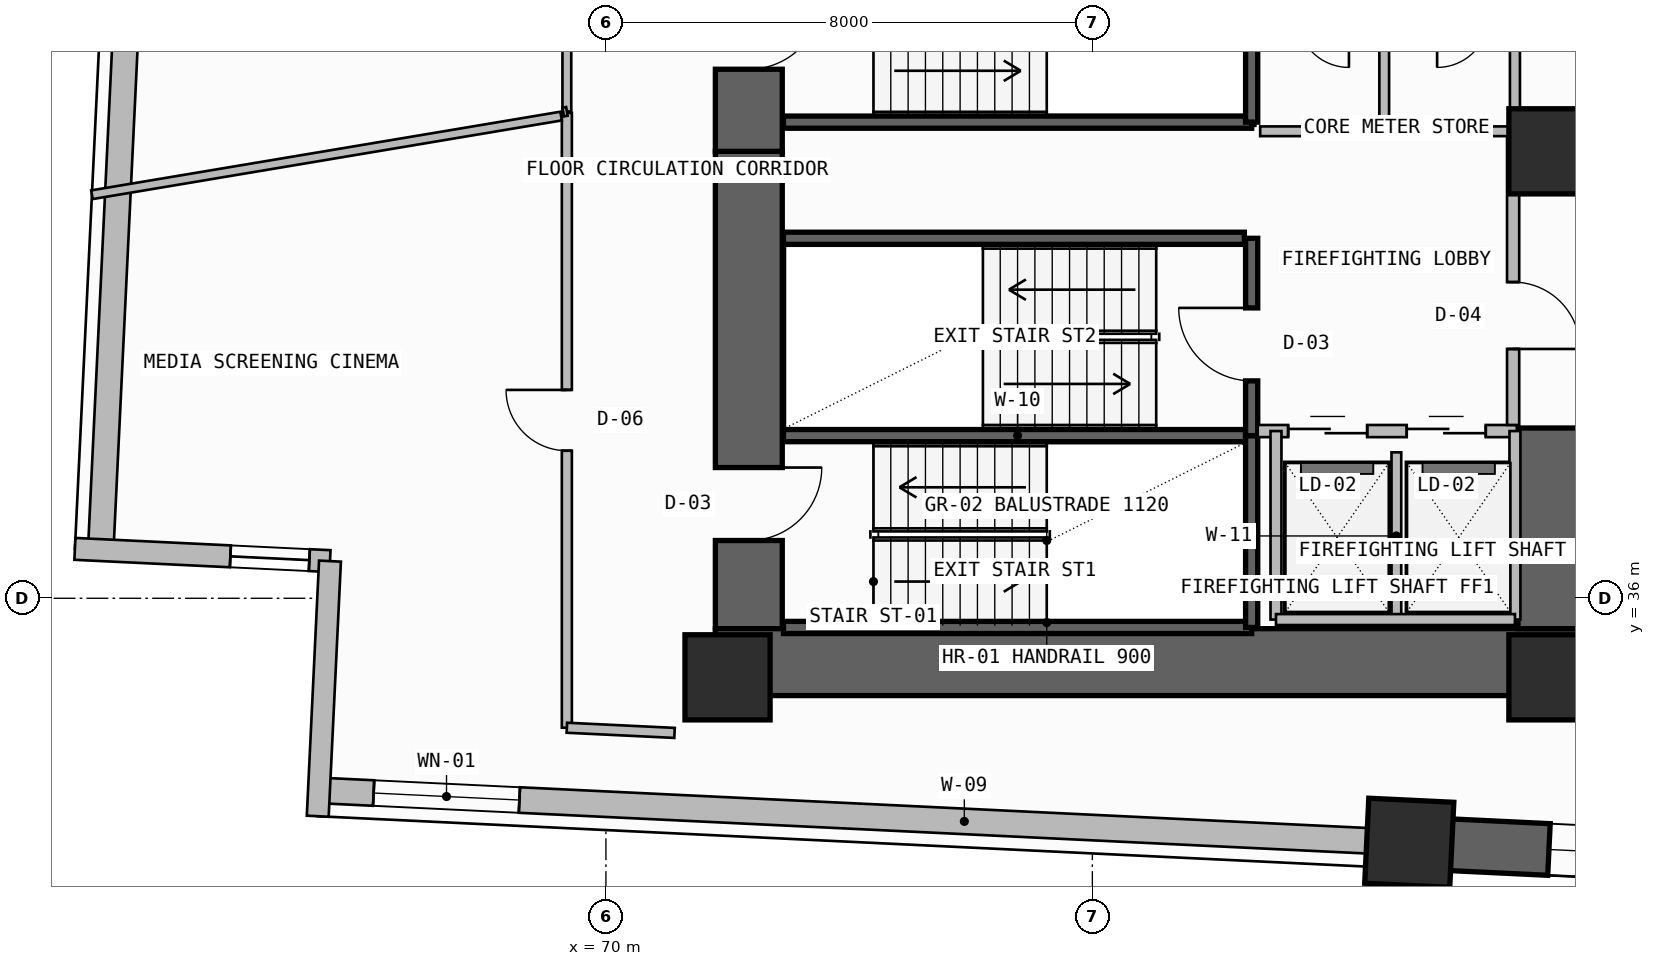
"""IFC4 building model, lengths in metres.
Left out: names, types, materials, properties, quantities, classifications, styles, units other than length and angle.
Written with IfcOpenShell. Run it as: python <this file> out.ifc"""

import sys

from ifc_helpers import new_model, si_unit, direction, frame, frame_2d, origin, origin_2d, place, context, subcontext, project, spatial, rectangle, extrude, element, fill, save


model = new_model("IFC4")
c1 = context("Model", 3, precision=1e-05, world=origin(), true_north=direction((0.0, 1.0)))
c2 = subcontext(c1, "Body", "Model", "MODEL_VIEW")
j1 = project(units=[si_unit("LENGTHUNIT", "METRE"), si_unit("PLANEANGLEUNIT", "RADIAN")], contexts=[c1])
p1 = place(None, origin())
s1 = spatial("IfcSite", under=j1, at=p1, CompositionType="ELEMENT")
p2 = place(p1, origin())
s2 = spatial("IfcBuilding", under=s1, at=p2, CompositionType="ELEMENT")
p3 = place(p2, frame((0.0, 0.0, 55.5)))
s3 = spatial("IfcBuildingStorey", under=s2, at=p3, CompositionType="ELEMENT", Elevation=55.5)
p4 = place(p3, frame((72.35, 35.5, -0.2), z_axis=(0.0, 0.0, 1.0), x_axis=(0.0, 1.0, 0.0)))
e1 = element("IfcWall", 1, at=p4, inside=s3, PredefinedType="SHEAR", context=c2, shape_type="SweptSolid", body=[
    extrude(rectangle(XDim=7.85, YDim=1.1, at=frame_2d((3.925, 0.0))), origin(), (0.0, 0.0, 1.0), 3.3),
])
p5 = place(p4, frame((1.45, 0.0, 0.2)))
e2 = element("IfcOpeningElement", 2, at=p5, cuts=e1, PredefinedType="OPENING", context=c2, shape_type="SweptSolid", body=[
    extrude(rectangle(XDim=1.2, YDim=2.2, at=frame_2d((0.6, 1.1))), frame((0.0, 0.56, 0.0), z_axis=(0.0, -1.0, 0.0), x_axis=(1.0, 0.0, 0.0)), (0.0, 0.0, 1.0), 1.12),
])
p6 = place(p3, frame((71.8, 34.95, -0.2), z_axis=(0.0, 0.0, 1.0), x_axis=(1.0, 0.0, 0.0)))
e3 = element("IfcWall", 3, at=p6, inside=s3, PredefinedType="SHEAR", context=c2, shape_type="SweptSolid", body=[
    extrude(rectangle(XDim=14.3, YDim=1.1, at=frame_2d((7.15, 0.0))), origin(), (0.0, 0.0, 1.0), 3.3),
])
p7 = place(p3, frame((85.55, 35.5, -0.2), z_axis=(0.0, 0.0, 1.0), x_axis=(0.0, 1.0, 0.0)))
e4 = element("IfcWall", 4, at=p7, inside=s3, PredefinedType="SHEAR", context=c2, shape_type="SweptSolid", body=[
    extrude(rectangle(XDim=3.3, YDim=1.1, at=frame_2d((1.65, 0.0))), origin(), (0.0, 0.0, 1.0), 3.3),
])
p8 = place(p3, frame((72.35, 43.35, -0.2), z_axis=(0.0, 0.0, 1.0), x_axis=(0.0, 1.0, 0.0)))
e5 = element("IfcWall", 5, at=p8, inside=s3, PredefinedType="SHEAR", context=c2, shape_type="SweptSolid", body=[
    extrude(rectangle(XDim=12.7, YDim=1.1, at=frame_2d((6.35, 0.0))), origin(), (0.0, 0.0, 1.0), 3.3),
])
p9 = place(p8, frame((1.35, 0.0, 0.2)))
e6 = element("IfcOpeningElement", 6, at=p9, cuts=e5, PredefinedType="OPENING", context=c2, shape_type="SweptSolid", body=[
    extrude(rectangle(XDim=1.2, YDim=2.2, at=frame_2d((0.6, 1.1))), frame((0.0, 0.56, 0.0), z_axis=(0.0, -1.0, 0.0), x_axis=(1.0, 0.0, 0.0)), (0.0, 0.0, 1.0), 1.12),
])
for number, where, z_axis, x_axis in (
    (7, (72.0, 34.7, 0.0), (0.0, 0.0, 1.0), (1.0, 0.0, 0.0)),
    (8, (85.55, 34.7, 0.0), (0.0, 0.0, 1.0), (1.0, 0.0, 0.0)),
    (9, (85.55, 43.35, 0.0), (0.0, 0.0, 1.0), (1.0, 0.0, 0.0)),
    (10, (83.212, 31.979, 0.0), (0.0, 0.0, 1.0), (-0.999, 0.048, 0.0)),
):
    element("IfcColumn", number, at=place(p3, frame(where, z_axis=z_axis, x_axis=x_axis)), inside=s3, PredefinedType="COLUMN", context=c2, shape_type="SweptSolid", body=[
        extrude(rectangle(XDim=1.4, YDim=1.4, at=origin_2d()), origin(), (0.0, 0.0, 1.0), 3.6),
    ])
p10 = place(p3, frame((65.281, 32.841, 0.0), z_axis=(0.0, 0.0, 1.0), x_axis=(0.998848298084, -0.047979968897, 0.0)))
e11 = element("IfcWall", 11, at=p10, inside=s3, PredefinedType="SOLIDWALL", context=c2, shape_type="SweptSolid", body=[
    extrude(rectangle(XDim=17.952, YDim=0.42, at=frame_2d((8.976, 0.0))), origin(), (0.0, 0.0, 1.0), 2.485),
])
p11 = place(p10, frame((0.9, 0.0, 1.2)))
e12 = element("IfcOpeningElement", 12, at=p11, cuts=e11, PredefinedType="OPENING", context=c2, shape_type="SweptSolid", body=[
    extrude(rectangle(XDim=2.4, YDim=0.9, at=frame_2d((1.2, 0.45))), frame((0.0, 0.22, 0.0), z_axis=(0.0, -1.0, 0.0), x_axis=(1.0, 0.0, 0.0)), (0.0, 0.0, 1.0), 0.44),
])
p12 = place(p3, frame((83.212, 31.979, -0.2), z_axis=(0.0, 0.0, 1.0), x_axis=(0.998848235141, -0.047981279227, 0.0)))
e13 = element("IfcWall", 13, at=p12, inside=s3, PredefinedType="SHEAR", context=c2, shape_type="SweptSolid", body=[
    extrude(rectangle(XDim=27.456, YDim=0.85, at=frame_2d((13.728, 0.0))), origin(), (0.0, 0.0, 1.0), 3.3),
])
p13 = place(p12, frame((2.3, 0.0, 1.2)))
e14 = element("IfcOpeningElement", 14, at=p13, cuts=e13, PredefinedType="OPENING", context=c2, shape_type="SweptSolid", body=[
    extrude(rectangle(XDim=2.4, YDim=0.9, at=frame_2d((1.2, 0.45))), frame((0.0, 0.435, 0.0), z_axis=(0.0, -1.0, 0.0), x_axis=(1.0, 0.0, 0.0)), (0.0, 0.0, 1.0), 0.87),
])
p14 = place(p3, frame((62.378, 51.09, 0.0), z_axis=(0.0, 0.0, 1.0), x_axis=(-0.047978424452, -0.99884837227, 0.0)))
e15 = element("IfcWall", 15, at=p14, inside=s3, PredefinedType="SOLIDWALL", context=c2, shape_type="SweptSolid", body=[
    extrude(rectangle(XDim=14.314, YDim=0.42, at=frame_2d((7.157, 0.0))), origin(), (0.0, 0.0, 1.0), 2.485),
])
p15 = place(p14, frame((2.3, 0.0, 1.2)))
e16 = element("IfcOpeningElement", 16, at=p15, cuts=e15, PredefinedType="OPENING", context=c2, shape_type="SweptSolid", body=[
    extrude(rectangle(XDim=2.4, YDim=0.9, at=frame_2d((1.2, 0.45))), frame((0.0, 0.22, 0.0), z_axis=(0.0, -1.0, 0.0), x_axis=(1.0, 0.0, 0.0)), (0.0, 0.0, 1.0), 0.44),
])
p16 = place(p3, frame((61.267, 36.812, 0.0), z_axis=(0.0, 0.0, 1.0), x_axis=(0.998849519138, -0.047954542207, 0.0)))
e17 = element("IfcWall", 17, at=p16, inside=s3, PredefinedType="SOLIDWALL", context=c2, shape_type="SweptSolid", body=[
    extrude(rectangle(XDim=4.2, YDim=0.36, at=frame_2d((2.1, 0.0))), origin(), (0.0, 0.0, 1.0), 3.1),
])
p17 = place(p16, frame((2.56, 0.0, 0.45)))
e18 = element("IfcOpeningElement", 18, at=p17, cuts=e17, PredefinedType="OPENING", context=c2, shape_type="SweptSolid", body=[
    extrude(rectangle(XDim=1.3, YDim=2.4, at=frame_2d((0.65, 1.2))), frame((0.0, 0.19, 0.0), z_axis=(0.0, -1.0, 0.0), x_axis=(1.0, 0.0, 0.0)), (0.0, 0.0, 1.0), 0.38),
])
p18 = place(p3, frame((65.462, 36.611, 0.0), z_axis=(0.0, 0.0, 1.0), x_axis=(-0.048015322758, -0.998846599224, 0.0)))
e19 = element("IfcWall", 19, at=p18, inside=s3, PredefinedType="SOLIDWALL", context=c2, shape_type="SweptSolid", body=[
    extrude(rectangle(XDim=4.2, YDim=0.36, at=frame_2d((2.1, 0.0))), origin(), (0.0, 0.0, 1.0), 3.1),
])
for number, where, z_axis, x_axis in (
    (20, (72.92, 35.52, -0.2), (0.0, 0.0, 1.0), (1.0, 0.0, 0.0)),
    (21, (72.92, 38.675, -0.2), (0.0, 0.0, 1.0), (1.0, 0.0, 0.0)),
):
    element("IfcWall", number, at=place(p3, frame(where, z_axis=z_axis, x_axis=x_axis)), inside=s3, PredefinedType="SOLIDWALL", context=c2, shape_type="SweptSolid", body=[
        extrude(rectangle(XDim=7.7, YDim=0.2, at=frame_2d((3.85, 0.0))), origin(), (0.0, 0.0, 1.0), 3.3),
    ])
p19 = place(p3, frame((80.62, 35.52, -0.2), z_axis=(0.0, 0.0, 1.0), x_axis=(0.0, 1.0, 0.0)))
e22 = element("IfcWall", 22, at=p19, inside=s3, PredefinedType="SOLIDWALL", context=c2, shape_type="SweptSolid", body=[
    extrude(rectangle(XDim=3.155, YDim=0.2, at=frame_2d((1.578, 0.0))), origin(), (0.0, 0.0, 1.0), 3.3),
])
p20 = place(p3, frame((80.62, 38.675, -0.2), z_axis=(0.0, 0.0, 1.0), x_axis=(0.0, 1.0, 0.0)))
e23 = element("IfcWall", 23, at=p20, inside=s3, PredefinedType="SOLIDWALL", context=c2, shape_type="SweptSolid", body=[
    extrude(rectangle(XDim=3.245, YDim=0.2, at=frame_2d((1.623, 0.0))), origin(), (0.0, 0.0, 1.0), 3.3),
])
p21 = place(p20, frame((0.9, 0.0, 0.2)))
e24 = element("IfcOpeningElement", 24, at=p21, cuts=e23, PredefinedType="OPENING", context=c2, shape_type="SweptSolid", body=[
    extrude(rectangle(XDim=1.2, YDim=2.2, at=frame_2d((0.6, 1.1))), frame((0.0, 0.11, 0.0), z_axis=(0.0, -1.0, 0.0), x_axis=(1.0, 0.0, 0.0)), (0.0, 0.0, 1.0), 0.22),
])
p22 = place(p3, frame((80.72, 38.75, 0.0), z_axis=(0.0, 0.0, 1.0), x_axis=(1.0, 0.0, 0.0)))
e25 = element("IfcWall", 25, at=p22, inside=s3, PredefinedType="SOLIDWALL", context=c2, shape_type="SweptSolid", body=[
    extrude(rectangle(XDim=4.26, YDim=0.2, at=frame_2d((2.13, 0.0))), origin(), (0.0, 0.0, 1.0), 3.1),
])
p23 = place(p22, frame((0.5, 0.0, 0.0)))
e26 = element("IfcOpeningElement", 26, at=p23, cuts=e25, PredefinedType="OPENING", context=c2, shape_type="SweptSolid", body=[
    extrude(rectangle(XDim=1.3, YDim=2.3, at=frame_2d((0.65, 1.15))), frame((0.0, 0.11, 0.0), z_axis=(0.0, -1.0, 0.0), x_axis=(1.0, 0.0, 0.0)), (0.0, 0.0, 1.0), 0.22),
])
p24 = place(p22, frame((2.45, 0.0, 0.0)))
e27 = element("IfcOpeningElement", 27, at=p24, cuts=e25, PredefinedType="OPENING", context=c2, shape_type="SweptSolid", body=[
    extrude(rectangle(XDim=1.3, YDim=2.3, at=frame_2d((0.65, 1.15))), frame((0.0, 0.11, 0.0), z_axis=(0.0, -1.0, 0.0), x_axis=(1.0, 0.0, 0.0)), (0.0, 0.0, 1.0), 0.22),
])
p25 = place(p3, frame((83.0, 35.65, 0.0), z_axis=(0.0, 0.0, 1.0), x_axis=(0.0, 1.0, 0.0)))
e28 = element("IfcWall", 28, at=p25, inside=s3, PredefinedType="PLUMBINGWALL", context=c2, shape_type="SweptSolid", body=[
    extrude(rectangle(XDim=2.75, YDim=0.16, at=frame_2d((1.375, 0.0))), origin(), (0.0, 0.0, 1.0), 3.1),
])
for number, where, z_axis, x_axis in (
    (29, (84.95, 35.65, 0.0), (0.0, 0.0, 1.0), (0.0, 1.0, 0.0)),
    (30, (81.02, 35.65, 0.0), (0.0, 0.0, 1.0), (0.0, 1.0, 0.0)),
):
    element("IfcWall", number, at=place(p3, frame(where, z_axis=z_axis, x_axis=x_axis)), inside=s3, PredefinedType="SOLIDWALL", context=c2, shape_type="SweptSolid", body=[
        extrude(rectangle(XDim=3.1, YDim=0.18, at=frame_2d((1.55, 0.0))), origin(), (0.0, 0.0, 1.0), 3.1),
    ])
p26 = place(p3, frame((81.02, 35.65, 0.0), z_axis=(0.0, 0.0, 1.0), x_axis=(1.0, 0.0, 0.0)))
e31 = element("IfcWall", 31, at=p26, inside=s3, PredefinedType="SOLIDWALL", context=c2, shape_type="SweptSolid", body=[
    extrude(rectangle(XDim=3.93, YDim=0.18, at=frame_2d((1.965, 0.0))), origin(), (0.0, 0.0, 1.0), 3.1),
])
p27 = place(p3, frame((84.92, 38.85, 0.0), z_axis=(0.0, 0.0, 1.0), x_axis=(0.0, 1.0, 0.0)))
e32 = element("IfcWall", 32, at=p27, inside=s3, PredefinedType="SOLIDWALL", context=c2, shape_type="SweptSolid", body=[
    extrude(rectangle(XDim=4.83, YDim=0.2, at=frame_2d((2.415, 0.0))), origin(), (0.0, 0.0, 1.0), 3.1),
])
p28 = place(p27, frame((1.25, 0.0, 0.0)))
e33 = element("IfcOpeningElement", 33, at=p28, cuts=e32, PredefinedType="OPENING", context=c2, shape_type="SweptSolid", body=[
    extrude(rectangle(XDim=1.1, YDim=2.2, at=frame_2d((0.55, 1.1))), frame((0.0, 0.11, 0.0), z_axis=(0.0, -1.0, 0.0), x_axis=(1.0, 0.0, 0.0)), (0.0, 0.0, 1.0), 0.22),
])
p29 = place(p3, frame((72.92, 41.92, -0.2), z_axis=(0.0, 0.0, 1.0), x_axis=(1.0, 0.0, 0.0)))
e34 = element("IfcWall", 34, at=p29, inside=s3, PredefinedType="SOLIDWALL", context=c2, shape_type="SweptSolid", body=[
    extrude(rectangle(XDim=7.58, YDim=0.2, at=frame_2d((3.79, 0.0))), origin(), (0.0, 0.0, 1.0), 3.3),
])
p30 = place(p3, frame((72.92, 43.83, -0.2), z_axis=(0.0, 0.0, 1.0), x_axis=(1.0, 0.0, 0.0)))
e35 = element("IfcWall", 35, at=p30, inside=s3, PredefinedType="SOLIDWALL", context=c2, shape_type="SweptSolid", body=[
    extrude(rectangle(XDim=7.7, YDim=0.2, at=frame_2d((3.85, 0.0))), origin(), (0.0, 0.0, 1.0), 3.3),
])
p31 = place(p3, frame((80.62, 43.83, -0.2), z_axis=(0.0, 0.0, 1.0), x_axis=(0.0, 1.0, 0.0)))
e36 = element("IfcWall", 36, at=p31, inside=s3, PredefinedType="SOLIDWALL", context=c2, shape_type="SweptSolid", body=[
    extrude(rectangle(XDim=3.24, YDim=0.2, at=frame_2d((1.62, 0.0))), origin(), (0.0, 0.0, 1.0), 3.3),
])
p32 = place(p3, frame((84.95, 43.68, 0.0), z_axis=(0.0, 0.0, 1.0), x_axis=(0.0, 1.0, 0.0)))
e37 = element("IfcWall", 37, at=p32, inside=s3, PredefinedType="PLUMBINGWALL", context=c2, shape_type="SweptSolid", body=[
    extrude(rectangle(XDim=1.9, YDim=0.165, at=frame_2d((0.95, 0.0))), origin(), (0.0, 0.0, 1.0), 3.1),
])
p33 = place(p3, frame((80.76, 43.68, 0.0), z_axis=(0.0, 0.0, 1.0), x_axis=(1.0, 0.0, 0.0)))
e38 = element("IfcWall", 38, at=p33, inside=s3, PredefinedType="PLUMBINGWALL", context=c2, shape_type="SweptSolid", body=[
    extrude(rectangle(XDim=4.19, YDim=0.16, at=frame_2d((2.095, 0.0))), origin(), (0.0, 0.0, 1.0), 3.1),
])
p34 = place(p3, frame((82.8, 43.68, 0.0), z_axis=(0.0, 0.0, 1.0), x_axis=(0.0, 1.0, 0.0)))
e39 = element("IfcWall", 39, at=p34, inside=s3, PredefinedType="PLUMBINGWALL", context=c2, shape_type="SweptSolid", body=[
    extrude(rectangle(XDim=1.9, YDim=0.16, at=frame_2d((0.95, 0.0))), origin(), (0.0, 0.0, 1.0), 3.1),
])
p35 = place(p3, frame((69.357, 43.982, 0.0), z_axis=(0.0, 0.0, 1.0), x_axis=(0.0, -1.0, 0.0)))
e40 = element("IfcWall", 40, at=p35, inside=s3, PredefinedType="PARTITIONING", context=c2, shape_type="SweptSolid", body=[
    extrude(rectangle(XDim=10.111, YDim=0.165, at=frame_2d((5.056, 0.0))), origin(), (0.0, 0.0, 1.0), 3.1),
])
p36 = place(p35, frame((4.556, 0.0, 0.0)))
e41 = element("IfcOpeningElement", 41, at=p36, cuts=e40, PredefinedType="OPENING", context=c2, shape_type="SweptSolid", body=[
    extrude(rectangle(XDim=1.0, YDim=2.2, at=frame_2d((0.5, 1.1))), frame((0.0, 0.093, 0.0), z_axis=(0.0, -1.0, 0.0), x_axis=(1.0, 0.0, 0.0)), (0.0, 0.0, 1.0), 0.185),
])
p37 = place(p3, frame((69.357, 33.871, 0.0), z_axis=(0.0, 0.0, 1.0), x_axis=(0.998844652559, -0.048055801453, 0.0)))
e42 = element("IfcWall", 42, at=p37, inside=s3, PredefinedType="PARTITIONING", context=c2, shape_type="SweptSolid", body=[
    extrude(rectangle(XDim=1.773, YDim=0.165, at=frame_2d((0.886, 0.0))), origin(), (0.0, 0.0, 1.0), 3.1),
])
p38 = place(p3, frame((61.546, 42.636, 0.0), z_axis=(0.0, 0.0, 1.0), x_axis=(0.986240855765, 0.165314773748, 0.0)))
e43 = element("IfcWall", 43, at=p38, inside=s3, PredefinedType="PARTITIONING", context=c2, shape_type="SweptSolid", body=[
    extrude(rectangle(XDim=7.824, YDim=0.145, at=frame_2d((3.912, 0.0))), origin(), (0.0, 0.0, 1.0), 3.1),
])
p39 = place(p3, frame((69.357, 48.792, 0.0), z_axis=(0.0, 0.0, 1.0), x_axis=(0.0, -1.0, 0.0)))
e44 = element("IfcWall", 44, at=p39, inside=s3, PredefinedType="PARTITIONING", context=c2, shape_type="SweptSolid", body=[
    extrude(rectangle(XDim=4.786, YDim=0.145, at=frame_2d((2.393, 0.0))), origin(), (0.0, 0.0, 1.0), 3.1),
])
p40 = place(p39, frame((1.943, 0.0, 0.0)))
e45 = element("IfcOpeningElement", 45, at=p40, cuts=e44, PredefinedType="OPENING", context=c2, shape_type="SweptSolid", body=[
    extrude(rectangle(XDim=0.9, YDim=2.1, at=frame_2d((0.45, 1.05))), frame((0.0, 0.083, 0.0), z_axis=(0.0, -1.0, 0.0), x_axis=(1.0, 0.0, 0.0)), (0.0, 0.0, 1.0), 0.165),
])
p41 = place(p3, frame((69.357, 44.007, 0.0), z_axis=(0.0, 0.0, 1.0), x_axis=(-0.985622254813, -0.168963815111, 0.0)))
e46 = element("IfcWall", 46, at=p41, inside=s3, PredefinedType="PARTITIONING", context=c2, shape_type="SweptSolid", body=[
    extrude(rectangle(XDim=0.061, YDim=0.145, at=frame_2d((0.03, 0.0))), origin(), (0.0, 0.0, 1.0), 3.1),
])
p42 = place(p11, origin())
e47 = element("IfcWindow", 47, at=p42, inside=s3, PartitioningType="SINGLE_PANEL", PredefinedType="WINDOW", context=c2, shape_type="SweptSolid", body=[
    extrude(rectangle(XDim=2.4, YDim=0.9, at=frame_2d((1.2, 0.45))), frame((0.0, 0.03, 0.0), z_axis=(0.0, -1.0, 0.0), x_axis=(1.0, 0.0, 0.0)), (0.0, 0.0, 1.0), 0.06),
])
fill(e12, e47)
p43 = place(p13, origin())
e48 = element("IfcWindow", 48, at=p43, inside=s3, PartitioningType="SINGLE_PANEL", PredefinedType="WINDOW", context=c2, shape_type="SweptSolid", body=[
    extrude(rectangle(XDim=2.4, YDim=0.9, at=frame_2d((1.2, 0.45))), frame((0.0, 0.03, 0.0), z_axis=(0.0, -1.0, 0.0), x_axis=(1.0, 0.0, 0.0)), (0.0, 0.0, 1.0), 0.06),
])
fill(e14, e48)
p44 = place(p17, origin())
e49 = element("IfcWindow", 49, at=p44, inside=s3, PartitioningType="SINGLE_PANEL", PredefinedType="WINDOW", context=c2, shape_type="SweptSolid", body=[
    extrude(rectangle(XDim=1.3, YDim=2.4, at=frame_2d((0.65, 1.2))), frame((0.0, 0.03, 0.0), z_axis=(0.0, -1.0, 0.0), x_axis=(1.0, 0.0, 0.0)), (0.0, 0.0, 1.0), 0.06),
])
fill(e18, e49)
p45 = place(p5, frame((1.2, 0.0, 0.0), z_axis=(0.0, 0.0, 1.0), x_axis=(-1.0, 0.0, 0.0)))
e50 = element("IfcDoor", 50, at=p45, inside=s3, OperationType="SINGLE_SWING_LEFT", PredefinedType="USERDEFINED", context=c2, shape_type="SweptSolid", body=[
    extrude(rectangle(XDim=1.2, YDim=2.2, at=frame_2d((0.6, 1.1))), frame((0.0, 0.025, 0.0), z_axis=(0.0, -1.0, 0.0), x_axis=(1.0, 0.0, 0.0)), (0.0, 0.0, 1.0), 0.05),
])
fill(e2, e50)
p46 = place(p21, origin())
e51 = element("IfcDoor", 51, at=p46, inside=s3, OperationType="SINGLE_SWING_RIGHT", PredefinedType="USERDEFINED", context=c2, shape_type="SweptSolid", body=[
    extrude(rectangle(XDim=1.2, YDim=2.2, at=frame_2d((0.6, 1.1))), frame((0.0, 0.025, 0.0), z_axis=(0.0, -1.0, 0.0), x_axis=(1.0, 0.0, 0.0)), (0.0, 0.0, 1.0), 0.05),
])
fill(e24, e51)
p47 = place(p23, origin())
e52 = element("IfcDoor", 52, at=p47, inside=s3, OperationType="DOUBLE_DOOR_SLIDING", PredefinedType="DOOR", context=c2, shape_type="SweptSolid", body=[
    extrude(rectangle(XDim=1.3, YDim=2.3, at=frame_2d((0.65, 1.15))), frame((0.0, 0.025, 0.0), z_axis=(0.0, -1.0, 0.0), x_axis=(1.0, 0.0, 0.0)), (0.0, 0.0, 1.0), 0.05),
])
fill(e26, e52)
p48 = place(p24, origin())
e53 = element("IfcDoor", 53, at=p48, inside=s3, OperationType="DOUBLE_DOOR_SLIDING", PredefinedType="DOOR", context=c2, shape_type="SweptSolid", body=[
    extrude(rectangle(XDim=1.3, YDim=2.3, at=frame_2d((0.65, 1.15))), frame((0.0, 0.025, 0.0), z_axis=(0.0, -1.0, 0.0), x_axis=(1.0, 0.0, 0.0)), (0.0, 0.0, 1.0), 0.05),
])
fill(e27, e53)
p49 = place(p28, frame((1.1, 0.0, 0.0), z_axis=(0.0, 0.0, 1.0), x_axis=(-1.0, 0.0, 0.0)))
e54 = element("IfcDoor", 54, at=p49, inside=s3, OperationType="SINGLE_SWING_RIGHT", PredefinedType="DOOR", context=c2, shape_type="SweptSolid", body=[
    extrude(rectangle(XDim=1.1, YDim=2.2, at=frame_2d((0.55, 1.1))), frame((0.0, 0.025, 0.0), z_axis=(0.0, -1.0, 0.0), x_axis=(1.0, 0.0, 0.0)), (0.0, 0.0, 1.0), 0.05),
])
fill(e33, e54)
p50 = place(p9, frame((1.2, 0.0, 0.0), z_axis=(0.0, 0.0, 1.0), x_axis=(-1.0, 0.0, 0.0)))
e55 = element("IfcDoor", 55, at=p50, inside=s3, OperationType="SINGLE_SWING_LEFT", PredefinedType="USERDEFINED", context=c2, shape_type="SweptSolid", body=[
    extrude(rectangle(XDim=1.2, YDim=2.2, at=frame_2d((0.6, 1.1))), frame((0.0, 0.025, 0.0), z_axis=(0.0, -1.0, 0.0), x_axis=(1.0, 0.0, 0.0)), (0.0, 0.0, 1.0), 0.05),
])
fill(e6, e55)
p51 = place(p36, frame((1.0, 0.0, 0.0), z_axis=(0.0, 0.0, 1.0), x_axis=(-1.0, 0.0, 0.0)))
e56 = element("IfcDoor", 56, at=p51, inside=s3, OperationType="SINGLE_SWING_RIGHT", PredefinedType="DOOR", context=c2, shape_type="SweptSolid", body=[
    extrude(rectangle(XDim=1.0, YDim=2.2, at=frame_2d((0.5, 1.1))), frame((0.0, 0.025, 0.0), z_axis=(0.0, -1.0, 0.0), x_axis=(1.0, 0.0, 0.0)), (0.0, 0.0, 1.0), 0.05),
])
fill(e41, e56)
save(model, sys.argv[1])
